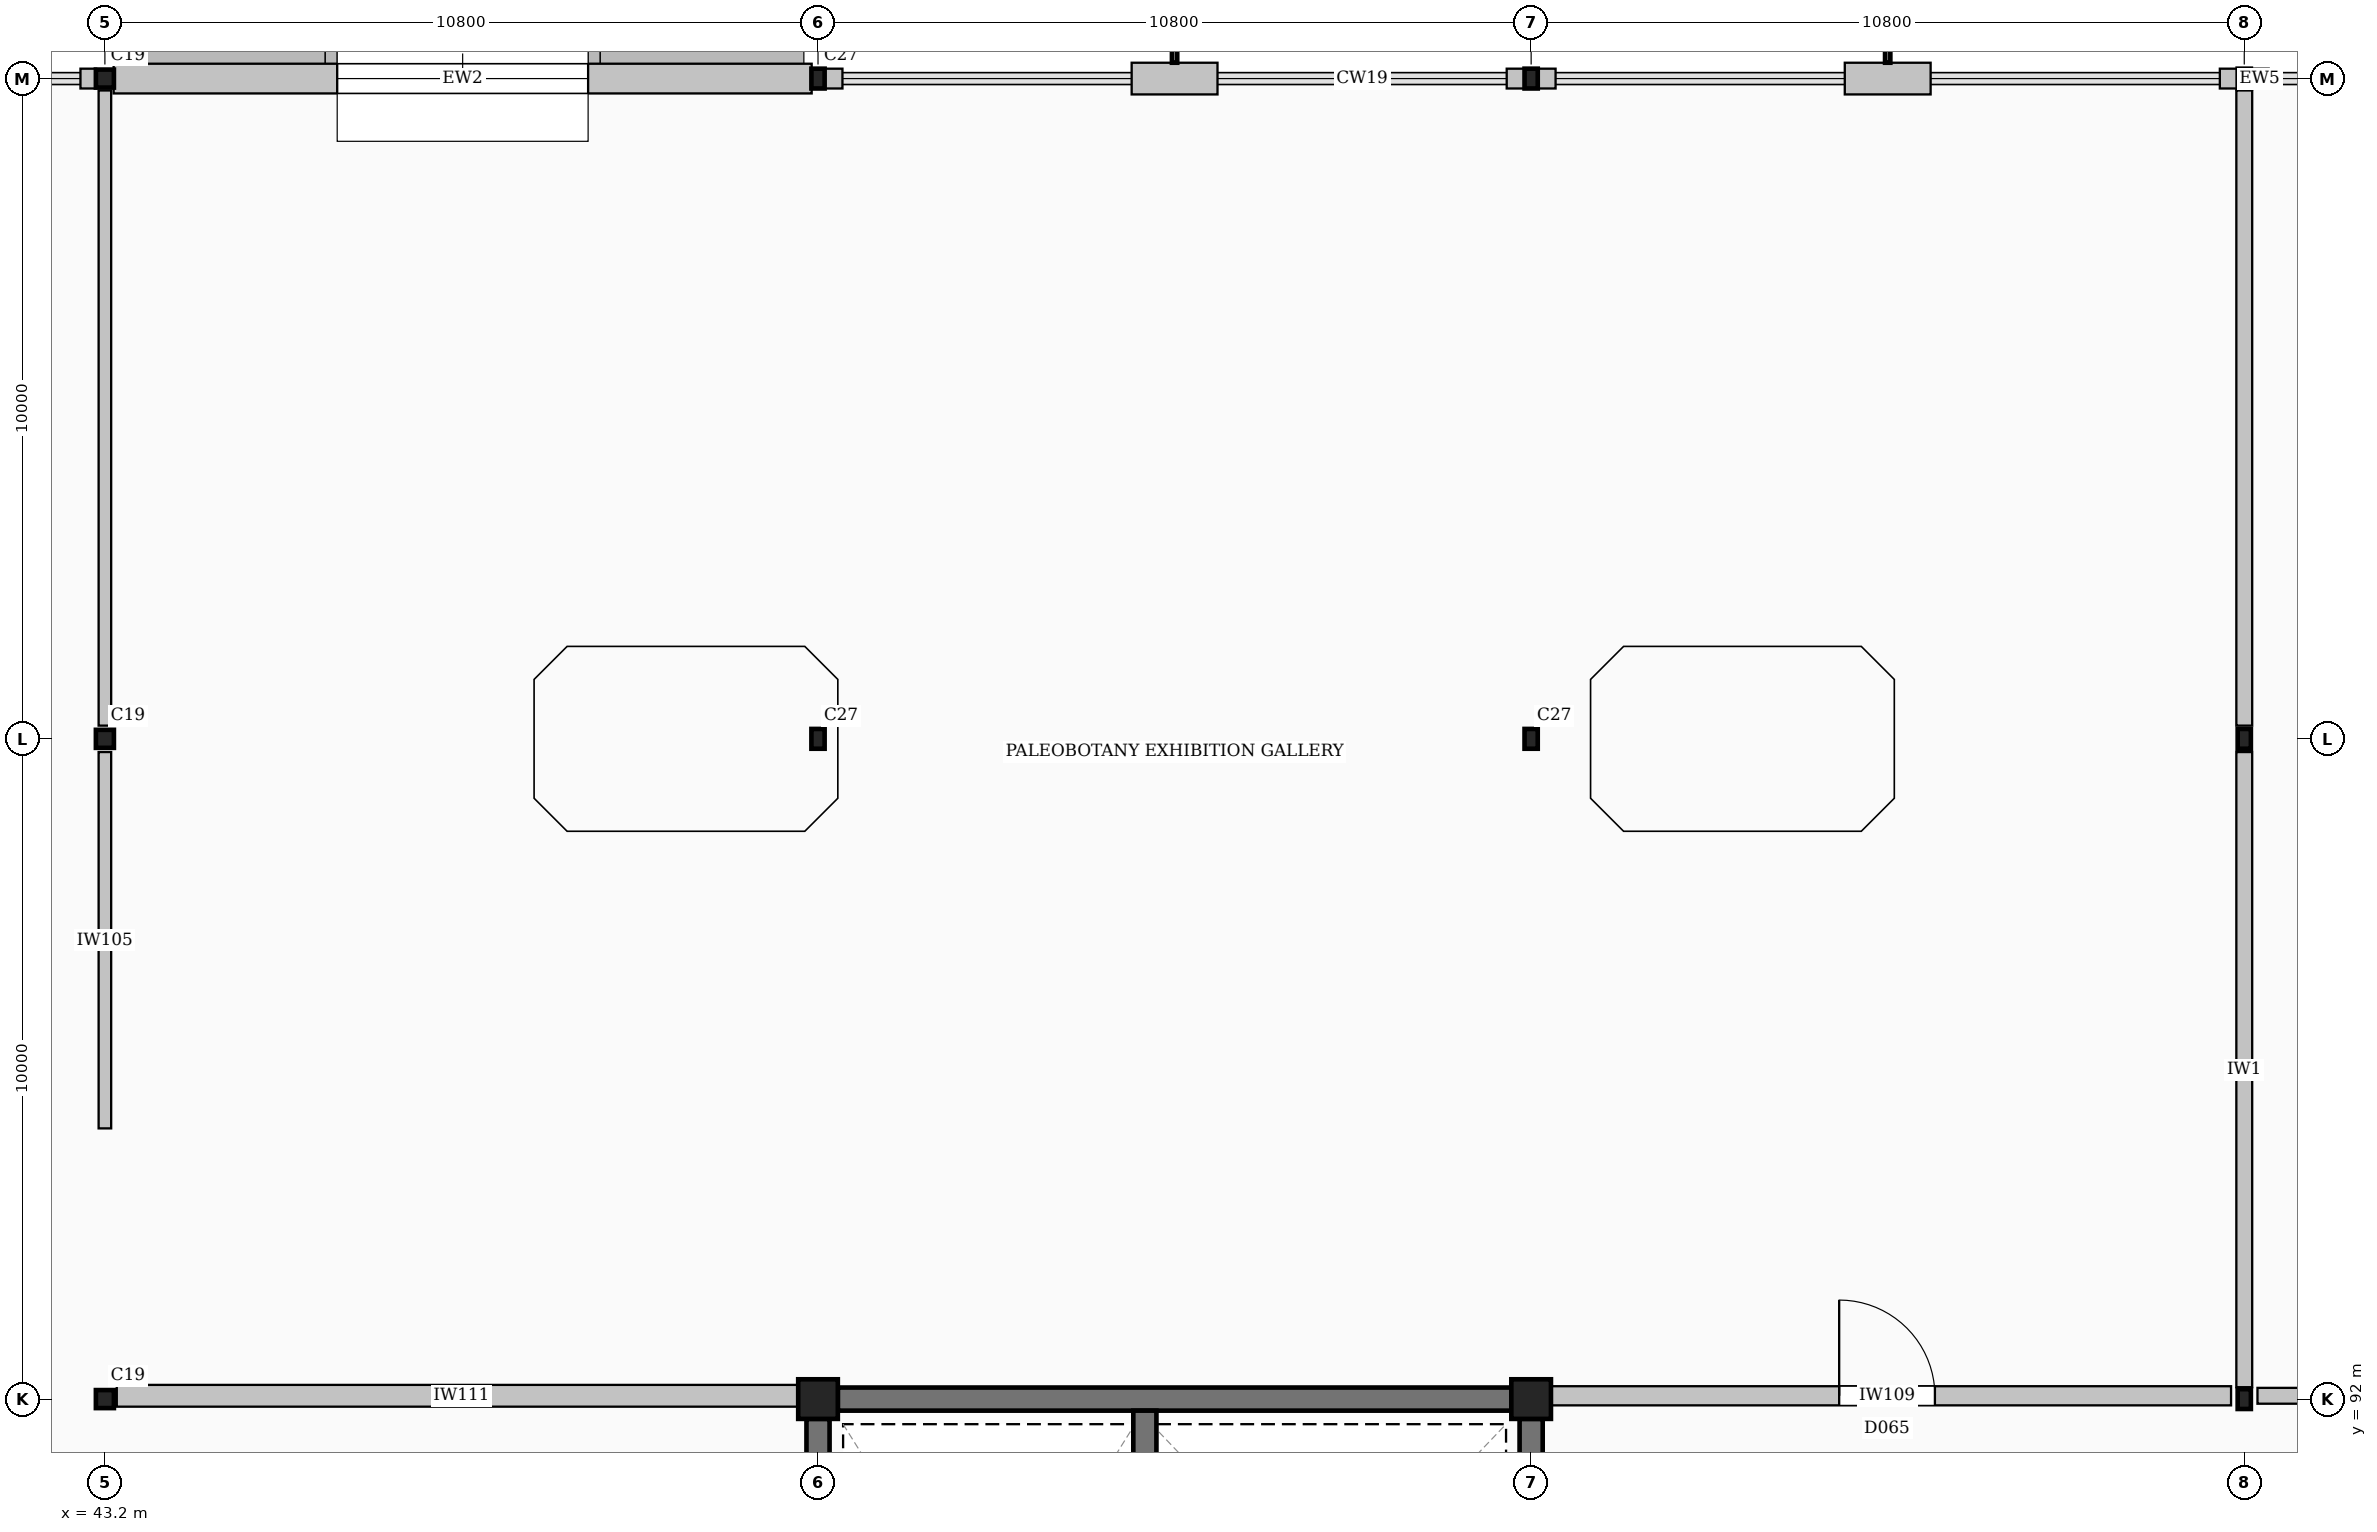
"""IFC4 building model, lengths in metres.
Left out: names, types, materials, properties, quantities, classifications, styles, units other than length and angle.
Written with IfcOpenShell. Run it as: python <this file> out.ifc"""

import sys

from ifc_helpers import new_model, si_unit, direction, frame, frame_2d, origin, origin_2d, place, context, subcontext, project, spatial, rectangle, hollow_rectangle, hollow_circle, extrude, element, fill, save


model = new_model("IFC4")
c1 = context("Model", 3, precision=1e-05, world=origin(), true_north=direction((0.0, 1.0)))
c2 = subcontext(c1, "Body", "Model", "MODEL_VIEW")
j1 = project(units=[si_unit("LENGTHUNIT", "METRE"), si_unit("PLANEANGLEUNIT", "RADIAN")], contexts=[c1])
p1 = place(None, origin())
s1 = spatial("IfcSite", under=j1, at=p1, CompositionType="ELEMENT")
p2 = place(p1, origin())
s2 = spatial("IfcBuilding", under=s1, at=p2, CompositionType="ELEMENT")
p3 = place(p2, frame((0.0, 0.0, 9.6)))
s3 = spatial("IfcBuildingStorey", under=s2, at=p3, CompositionType="ELEMENT", Elevation=9.6)
for number, where, z_axis, x_axis in (
    (1, (43.2, 92.0, 0.0), (0.0, 0.0, 1.0), (1.0, 0.0, 0.0)),
    (2, (43.2, 102.0, 0.0), (0.0, 0.0, 1.0), (1.0, 0.0, 0.0)),
    (3, (43.2, 112.0, 0.0), (0.0, 0.0, 1.0), (1.0, 0.0, 0.0)),
):
    element("IfcColumn", number, at=place(p3, frame(where, z_axis=z_axis, x_axis=x_axis)), inside=s3, PredefinedType="COLUMN", context=c2, shape_type="SweptSolid", body=[
        extrude(hollow_circle(Radius=0.136, WallThickness=0.012, at=origin_2d()), origin(), (0.0, 0.0, 1.0), 4.8),
    ])
p4 = place(p3, frame((54.0, 92.0, 0.0), z_axis=(0.0, 0.0, 1.0), x_axis=(1.0, 0.0, 0.0)))
e4 = element("IfcColumn", 4, at=p4, inside=s3, PredefinedType="COLUMN", context=c2, shape_type="SweptSolid", body=[
    extrude(rectangle(XDim=0.6, YDim=0.6, at=origin_2d()), origin(), (0.0, 0.0, 1.0), 4.8),
])
for number, where, z_axis, x_axis in (
    (5, (54.0, 102.0, 0.0), (0.0, 0.0, 1.0), (1.0, 0.0, 0.0)),
    (6, (54.0, 112.0, 0.0), (0.0, 0.0, 1.0), (1.0, 0.0, 0.0)),
):
    element("IfcColumn", number, at=place(p3, frame(where, z_axis=z_axis, x_axis=x_axis)), inside=s3, PredefinedType="COLUMN", context=c2, shape_type="SweptSolid", body=[
        extrude(hollow_rectangle(XDim=0.2, YDim=0.3, WallThickness=0.012, InnerFilletRadius=0.012, OuterFilletRadius=0.025, at=origin_2d()), origin(), (0.0, 0.0, 1.0), 4.8),
    ])
p5 = place(p3, frame((64.8, 92.0, 0.0), z_axis=(0.0, 0.0, 1.0), x_axis=(1.0, 0.0, 0.0)))
e7 = element("IfcColumn", 7, at=p5, inside=s3, PredefinedType="COLUMN", context=c2, shape_type="SweptSolid", body=[
    extrude(rectangle(XDim=0.6, YDim=0.6, at=origin_2d()), origin(), (0.0, 0.0, 1.0), 4.8),
])
for number, where, z_axis, x_axis in (
    (8, (64.8, 102.0, 0.0), (0.0, 0.0, 1.0), (1.0, 0.0, 0.0)),
    (9, (64.8, 112.0, 0.0), (0.0, 0.0, 1.0), (1.0, 0.0, 0.0)),
    (10, (75.6, 92.0, 0.0), (0.0, 0.0, 1.0), (1.0, 0.0, 0.0)),
    (11, (75.6, 102.0, 0.0), (0.0, 0.0, 1.0), (1.0, 0.0, 0.0)),
    (12, (75.6, 112.0, 0.0), (0.0, 0.0, 1.0), (1.0, 0.0, 0.0)),
):
    element("IfcColumn", number, at=place(p3, frame(where, z_axis=z_axis, x_axis=x_axis)), inside=s3, PredefinedType="COLUMN", context=c2, shape_type="SweptSolid", body=[
        extrude(hollow_rectangle(XDim=0.2, YDim=0.3, WallThickness=0.012, InnerFilletRadius=0.012, OuterFilletRadius=0.025, at=origin_2d()), origin(), (0.0, 0.0, 1.0), 4.8),
    ])
p6 = place(p3, frame((75.97, 112.0, 0.0), z_axis=(0.0, 0.0, 1.0), x_axis=(-1.0, 0.0, 0.0)))
e13 = element("IfcWall", 13, at=p6, inside=s3, PredefinedType="STANDARD", context=c2, shape_type="SweptSolid", body=[
    extrude(rectangle(XDim=0.274, YDim=0.3, at=frame_2d((0.137, 0.0))), origin(), (0.0, 0.0, 1.0), 4.56),
])
p7 = place(p3, frame((70.85, 112.0, 0.0), z_axis=(0.0, 0.0, 1.0), x_axis=(-1.0, 0.0, 0.0)))
e14 = element("IfcWall", 14, at=p7, inside=s3, PredefinedType="STANDARD", context=c2, shape_type="SweptSolid", body=[
    extrude(rectangle(XDim=1.3, YDim=0.48, at=frame_2d((0.65, 0.0))), origin(), (0.0, 0.0, 1.0), 4.119),
])
for number, where, z_axis, x_axis in (
    (15, (75.504, 112.0, 0.0), (0.0, 0.0, 1.0), (-1.0, 0.0, 0.0)),
    (16, (65.17, 112.0, 0.0), (0.0, 0.0, 1.0), (-1.0, 0.0, 0.0)),
):
    element("IfcWall", number, at=place(p3, frame(where, z_axis=z_axis, x_axis=x_axis)), inside=s3, PredefinedType="STANDARD", context=c2, shape_type="SweptSolid", body=[
        extrude(rectangle(XDim=0.274, YDim=0.3, at=frame_2d((0.137, 0.0))), origin(), (0.0, 0.0, 1.0), 4.56),
    ])
p8 = place(p3, frame((60.05, 112.0, 0.0), z_axis=(0.0, 0.0, 1.0), x_axis=(-1.0, 0.0, 0.0)))
e17 = element("IfcWall", 17, at=p8, inside=s3, PredefinedType="STANDARD", context=c2, shape_type="SweptSolid", body=[
    extrude(rectangle(XDim=1.3, YDim=0.48, at=frame_2d((0.65, 0.0))), origin(), (0.0, 0.0, 1.0), 4.119),
])
for number, where, z_axis, x_axis in (
    (18, (64.704, 112.0, 0.0), (0.0, 0.0, 1.0), (-1.0, 0.0, 0.0)),
    (19, (54.37, 112.0, 0.0), (0.0, 0.0, 1.0), (-1.0, 0.0, 0.0)),
):
    element("IfcWall", number, at=place(p3, frame(where, z_axis=z_axis, x_axis=x_axis)), inside=s3, PredefinedType="STANDARD", context=c2, shape_type="SweptSolid", body=[
        extrude(rectangle(XDim=0.274, YDim=0.3, at=frame_2d((0.137, 0.0))), origin(), (0.0, 0.0, 1.0), 4.56),
    ])
p9 = place(p3, frame((53.904, 112.0, 0.0), z_axis=(0.0, 0.0, 1.0), x_axis=(-1.0, 0.0, 0.0)))
e20 = element("IfcWall", 20, at=p9, inside=s3, PredefinedType="STANDARD", context=c2, shape_type="SweptSolid", body=[
    extrude(rectangle(XDim=10.572, YDim=0.45, at=frame_2d((5.286, 0.0))), origin(), (0.0, 0.0, 1.0), 4.119),
])
p10 = place(p9, frame((3.386, 0.0, 1.0)))
e21 = element("IfcOpeningElement", 21, at=p10, cuts=e20, PredefinedType="OPENING", context=c2, shape_type="SweptSolid", body=[
    extrude(rectangle(XDim=3.8, YDim=2.1, at=frame_2d((1.9, 1.05))), frame((0.0, 0.235, 0.0), z_axis=(0.0, -1.0, 0.0), x_axis=(1.0, 0.0, 0.0)), (0.0, 0.0, 1.0), 0.47),
])
p11 = place(p3, frame((43.067, 112.0, 0.0), z_axis=(0.0, 0.0, 1.0), x_axis=(-1.0, 0.0, 0.0)))
e22 = element("IfcWall", 22, at=p11, inside=s3, PredefinedType="STANDARD", context=c2, shape_type="SweptSolid", body=[
    extrude(rectangle(XDim=0.237, YDim=0.3, at=frame_2d((0.119, 0.0))), origin(), (0.0, 0.0, 1.0), 4.56),
])
p12 = place(p3, frame((54.3, 92.0, 0.0), z_axis=(0.0, 0.0, 1.0), x_axis=(1.0, 0.0, 0.0)))
e23 = element("IfcWall", 23, at=p12, inside=s3, PredefinedType="SHEAR", context=c2, shape_type="SweptSolid", body=[
    extrude(rectangle(XDim=10.2, YDim=0.35, at=frame_2d((5.1, 0.0))), origin(), (0.0, 0.0, 1.0), 4.56),
])
p13 = place(p3, frame((54.0, 82.3, 0.0), z_axis=(0.0, 0.0, 1.0), x_axis=(0.0, 1.0, 0.0)))
e24 = element("IfcWall", 24, at=p13, inside=s3, PredefinedType="SHEAR", context=c2, shape_type="SweptSolid", body=[
    extrude(rectangle(XDim=9.4, YDim=0.35, at=frame_2d((4.7, 0.0))), origin(), (0.0, 0.0, 1.0), 4.56),
])
p14 = place(p3, frame((64.8, 82.3, 0.0), z_axis=(0.0, 0.0, 1.0), x_axis=(0.0, 1.0, 0.0)))
e25 = element("IfcWall", 25, at=p14, inside=s3, PredefinedType="SHEAR", context=c2, shape_type="SweptSolid", body=[
    extrude(rectangle(XDim=9.4, YDim=0.35, at=frame_2d((4.7, 0.0))), origin(), (0.0, 0.0, 1.0), 4.56),
])
p15 = place(p14, frame((0.88, 0.0, 0.0)))
e26 = element("IfcOpeningElement", 26, at=p15, cuts=e25, PredefinedType="OPENING", context=c2, shape_type="SweptSolid", body=[
    extrude(rectangle(XDim=1.8, YDim=2.25, at=frame_2d((0.9, 1.125))), frame((0.0, 0.185, 0.0), z_axis=(0.0, -1.0, 0.0), x_axis=(1.0, 0.0, 0.0)), (0.0, 0.0, 1.0), 0.37),
])
p16 = place(p3, frame((58.95, 82.175, 0.0), z_axis=(0.0, 0.0, 1.0), x_axis=(0.0, 1.0, 0.0)))
e27 = element("IfcWall", 27, at=p16, inside=s3, PredefinedType="SHEAR", context=c2, shape_type="SweptSolid", body=[
    extrude(rectangle(XDim=9.65, YDim=0.35, at=frame_2d((4.825, 0.0))), origin(), (0.0, 0.0, 1.0), 4.56),
])
p17 = place(p16, frame((0.9, 0.0, 0.0)))
e28 = element("IfcOpeningElement", 28, at=p17, cuts=e27, PredefinedType="OPENING", context=c2, shape_type="SweptSolid", body=[
    extrude(rectangle(XDim=1.1, YDim=2.2, at=frame_2d((0.55, 1.1))), frame((0.0, 0.185, 0.0), z_axis=(0.0, -1.0, 0.0), x_axis=(1.0, 0.0, 0.0)), (0.0, 0.0, 1.0), 0.37),
])
p18 = place(p3, frame((64.98, 92.05, 0.0), z_axis=(0.0, 0.0, 1.0), x_axis=(1.0, 0.0, 0.0)))
e29 = element("IfcWall", 29, at=p18, inside=s3, PredefinedType="PARTITIONING", context=c2, shape_type="SweptSolid", body=[
    extrude(rectangle(XDim=10.42, YDim=0.29, at=frame_2d((5.21, 0.0))), origin(), (0.0, 0.0, 1.0), 4.119),
])
p19 = place(p18, frame((4.485, 0.0, 0.0)))
e30 = element("IfcOpeningElement", 30, at=p19, cuts=e29, PredefinedType="OPENING", context=c2, shape_type="SweptSolid", body=[
    extrude(rectangle(XDim=1.45, YDim=2.35, at=frame_2d((0.725, 1.175))), frame((0.0, 0.155, 0.0), z_axis=(0.0, -1.0, 0.0), x_axis=(1.0, 0.0, 0.0)), (0.0, 0.0, 1.0), 0.31),
])
p20 = place(p3, frame((75.8, 92.05, 0.0), z_axis=(0.0, 0.0, 1.0), x_axis=(1.0, 0.0, 0.0)))
e31 = element("IfcWall", 31, at=p20, inside=s3, PredefinedType="SOLIDWALL", context=c2, shape_type="SweptSolid", body=[
    extrude(rectangle(XDim=10.4, YDim=0.24, at=frame_2d((5.2, 0.0))), origin(), (0.0, 0.0, 1.0), 4.119),
])
p21 = place(p3, frame((43.38, 92.05, 0.0), z_axis=(0.0, 0.0, 1.0), x_axis=(1.0, 0.0, 0.0)))
e32 = element("IfcWall", 32, at=p21, inside=s3, PredefinedType="PARTITIONING", context=c2, shape_type="SweptSolid", body=[
    extrude(rectangle(XDim=10.44, YDim=0.33, at=frame_2d((5.22, 0.0))), origin(), (0.0, 0.0, 1.0), 4.119),
])
p22 = place(p3, frame((43.2, 96.1, 0.0), z_axis=(0.0, 0.0, 1.0), x_axis=(0.0, 1.0, 0.0)))
e33 = element("IfcWall", 33, at=p22, inside=s3, PredefinedType="PARTITIONING", context=c2, shape_type="SweptSolid", body=[
    extrude(rectangle(XDim=5.7, YDim=0.19, at=frame_2d((2.85, 0.0))), origin(), (0.0, 0.0, 1.0), 4.059),
])
p23 = place(p3, frame((43.2, 102.2, 0.0), z_axis=(0.0, 0.0, 1.0), x_axis=(0.0, 1.0, 0.0)))
e34 = element("IfcWall", 34, at=p23, inside=s3, PredefinedType="PARTITIONING", context=c2, shape_type="SweptSolid", body=[
    extrude(rectangle(XDim=9.62, YDim=0.19, at=frame_2d((4.81, 0.0))), origin(), (0.0, 0.0, 1.0), 4.059),
])
for number, where, z_axis, x_axis in (
    (35, (75.6, 92.18, 0.0), (0.0, 0.0, 1.0), (0.0, 1.0, 0.0)),
    (36, (75.6, 102.2, 0.0), (0.0, 0.0, 1.0), (0.0, 1.0, 0.0)),
):
    element("IfcWall", number, at=place(p3, frame(where, z_axis=z_axis, x_axis=x_axis)), inside=s3, PredefinedType="SOLIDWALL", context=c2, shape_type="SweptSolid", body=[
        extrude(rectangle(XDim=9.62, YDim=0.24, at=frame_2d((4.81, 0.0))), origin(), (0.0, 0.0, 1.0), 4.059),
    ])
p24 = place(p10, origin())
e37 = element("IfcWindow", 37, at=p24, inside=s3, PartitioningType="SINGLE_PANEL", PredefinedType="WINDOW", context=c2, shape_type="SweptSolid", body=[
    extrude(rectangle(XDim=3.8, YDim=2.1, at=frame_2d((1.9, 1.05))), frame((0.0, 0.03, 0.0), z_axis=(0.0, -1.0, 0.0), x_axis=(1.0, 0.0, 0.0)), (0.0, 0.0, 1.0), 0.06),
])
fill(e21, e37)
p25 = place(p19, origin())
e38 = element("IfcDoor", 38, at=p25, inside=s3, OperationType="SINGLE_SWING_LEFT", PredefinedType="DOOR", context=c2, shape_type="SweptSolid", body=[
    extrude(rectangle(XDim=1.45, YDim=2.35, at=frame_2d((0.725, 1.175))), frame((0.0, 0.025, 0.0), z_axis=(0.0, -1.0, 0.0), x_axis=(1.0, 0.0, 0.0)), (0.0, 0.0, 1.0), 0.05),
])
fill(e30, e38)
save(model, sys.argv[1])
